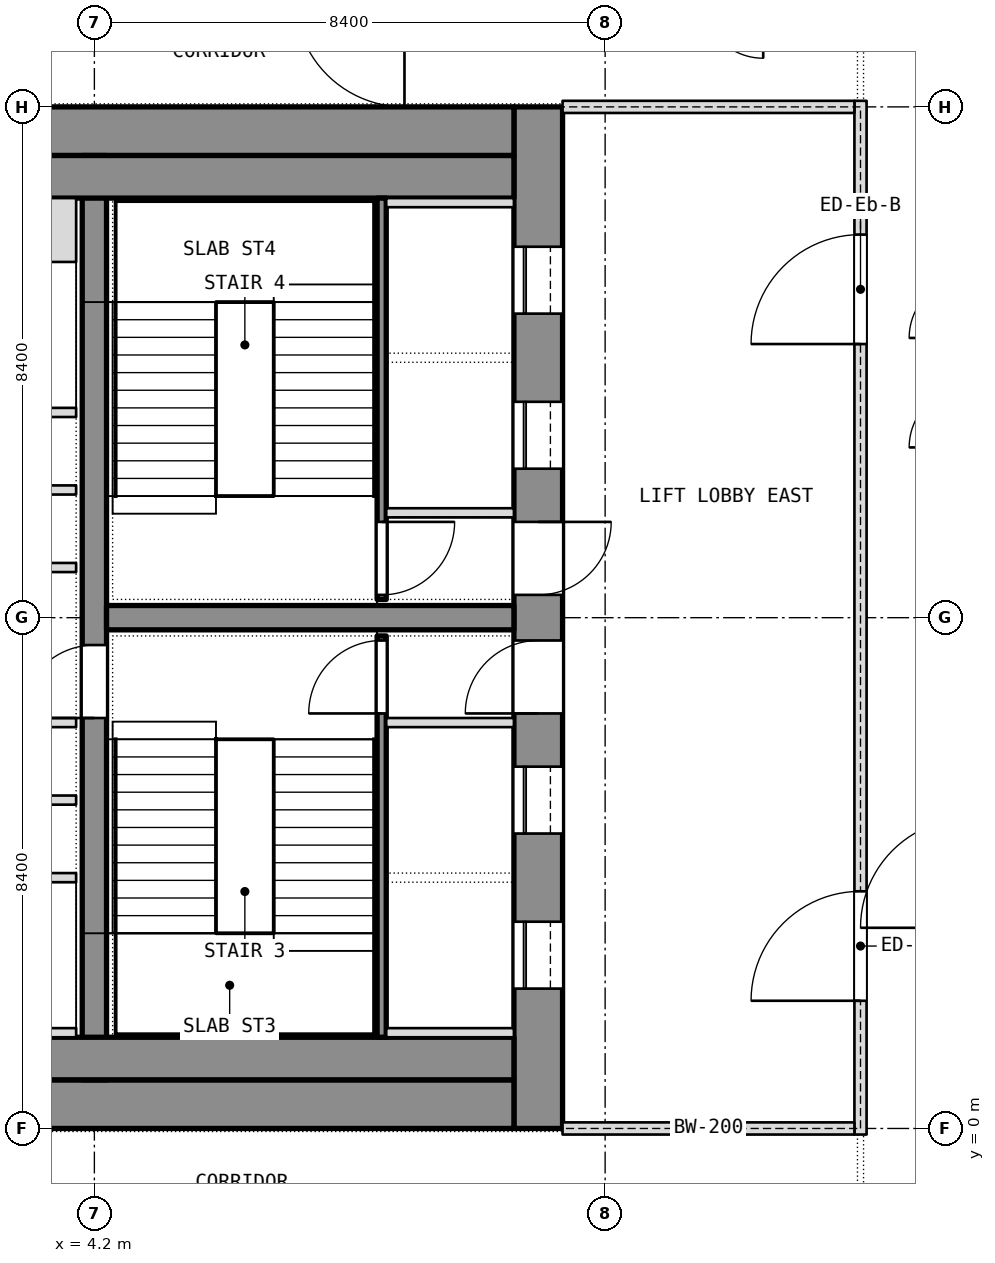
"""IFC4 building model, lengths in metres.
Left out: names, types, materials, properties, quantities, classifications, styles, units other than length and angle.
Written with IfcOpenShell. Run it as: python <this file> out.ifc"""

import sys

from ifc_helpers import new_model, si_unit, direction, frame, frame_2d, origin, place, context, subcontext, project, spatial, rectangle, extrude, element, fill, save


model = new_model("IFC4")
c1 = context("Model", 3, precision=1e-05, world=origin(), true_north=direction((0.0, 1.0)))
c2 = subcontext(c1, "Body", "Model", "MODEL_VIEW")
j1 = project(units=[si_unit("LENGTHUNIT", "METRE"), si_unit("PLANEANGLEUNIT", "RADIAN")], contexts=[c1])
p1 = place(None, origin())
s1 = spatial("IfcSite", under=j1, at=p1, CompositionType="ELEMENT")
p2 = place(p1, origin())
s2 = spatial("IfcBuilding", under=s1, at=p2, CompositionType="ELEMENT")
p3 = place(p2, frame((0.0, 0.0, 202.1)))
s3 = spatial("IfcBuildingStorey", under=s2, at=p3, CompositionType="ELEMENT", Elevation=202.1)
p4 = place(p3, frame((11.5, 0.0, 0.0), z_axis=(0.0, 0.0, 1.0), x_axis=(0.0, 1.0, 0.0)))
e1 = element("IfcWall", 1, at=p4, inside=s3, PredefinedType="SHEAR", context=c2, shape_type="SweptSolid", body=[
    extrude(rectangle(XDim=16.8, YDim=0.8, at=frame_2d((8.4, 0.0))), origin(), (0.0, 0.0, 1.0), 3.6),
])
p5 = place(p4, frame((2.3, 0.0, 0.0)))
e2 = element("IfcOpeningElement", 2, at=p5, cuts=e1, PredefinedType="OPENING", context=c2, shape_type="SweptSolid", body=[
    extrude(rectangle(XDim=1.1, YDim=2.1, at=frame_2d((0.55, 1.05))), frame((0.0, 0.4, 0.0), z_axis=(0.0, -1.0, 0.0), x_axis=(1.0, 0.0, 0.0)), (0.0, 0.0, 1.0), 0.8),
])
p6 = place(p4, frame((4.85, 0.0, 0.0)))
e3 = element("IfcOpeningElement", 3, at=p6, cuts=e1, PredefinedType="OPENING", context=c2, shape_type="SweptSolid", body=[
    extrude(rectangle(XDim=1.1, YDim=2.1, at=frame_2d((0.55, 1.05))), frame((0.0, 0.4, 0.0), z_axis=(0.0, -1.0, 0.0), x_axis=(1.0, 0.0, 0.0)), (0.0, 0.0, 1.0), 0.8),
])
p7 = place(p4, frame((6.825, 0.0, 0.0)))
e4 = element("IfcOpeningElement", 4, at=p7, cuts=e1, PredefinedType="OPENING", context=c2, shape_type="SweptSolid", body=[
    extrude(rectangle(XDim=1.2, YDim=2.1, at=frame_2d((0.6, 1.05))), frame((0.0, 0.4, 0.0), z_axis=(0.0, -1.0, 0.0), x_axis=(1.0, 0.0, 0.0)), (0.0, 0.0, 1.0), 0.8),
])
p8 = place(p4, frame((13.4, 0.0, 0.0)))
e5 = element("IfcOpeningElement", 5, at=p8, cuts=e1, PredefinedType="OPENING", context=c2, shape_type="SweptSolid", body=[
    extrude(rectangle(XDim=1.1, YDim=2.1, at=frame_2d((0.55, 1.05))), frame((0.0, 0.4, 0.0), z_axis=(0.0, -1.0, 0.0), x_axis=(1.0, 0.0, 0.0)), (0.0, 0.0, 1.0), 0.8),
])
p9 = place(p4, frame((10.85, 0.0, 0.0)))
e6 = element("IfcOpeningElement", 6, at=p9, cuts=e1, PredefinedType="OPENING", context=c2, shape_type="SweptSolid", body=[
    extrude(rectangle(XDim=1.1, YDim=2.1, at=frame_2d((0.55, 1.05))), frame((0.0, 0.4, 0.0), z_axis=(0.0, -1.0, 0.0), x_axis=(1.0, 0.0, 0.0)), (0.0, 0.0, 1.0), 0.8),
])
p10 = place(p4, frame((8.775, 0.0, 0.0)))
e7 = element("IfcOpeningElement", 7, at=p10, cuts=e1, PredefinedType="OPENING", context=c2, shape_type="SweptSolid", body=[
    extrude(rectangle(XDim=1.2, YDim=2.1, at=frame_2d((0.6, 1.05))), frame((0.0, 0.4, 0.0), z_axis=(0.0, -1.0, 0.0), x_axis=(1.0, 0.0, 0.0)), (0.0, 0.0, 1.0), 0.8),
])
for number, where, z_axis, x_axis in (
    (8, (-11.1, 0.4, 0.0), (0.0, 0.0, 1.0), (1.0, 0.0, 0.0)),
    (9, (-11.1, 16.4, 0.0), (0.0, 0.0, 1.0), (1.0, 0.0, 0.0)),
):
    element("IfcWall", number, at=place(p3, frame(where, z_axis=z_axis, x_axis=x_axis)), inside=s3, PredefinedType="SHEAR", context=c2, shape_type="SweptSolid", body=[
        extrude(rectangle(XDim=22.2, YDim=0.8, at=frame_2d((11.1, 0.0))), origin(), (0.0, 0.0, 1.0), 3.6),
    ])
p11 = place(p3, frame((4.2, 0.8, 0.0), z_axis=(0.0, 0.0, 1.0), x_axis=(0.0, 1.0, 0.0)))
e10 = element("IfcWall", 10, at=p11, inside=s3, PredefinedType="SHEAR", context=c2, shape_type="SweptSolid", body=[
    extrude(rectangle(XDim=15.2, YDim=0.4, at=frame_2d((7.6, 0.0))), origin(), (0.0, 0.0, 1.0), 3.6),
])
p12 = place(p11, frame((5.95, 0.0, 0.0)))
e11 = element("IfcOpeningElement", 11, at=p12, cuts=e10, PredefinedType="OPENING", context=c2, shape_type="SweptSolid", body=[
    extrude(rectangle(XDim=1.2, YDim=2.1, at=frame_2d((0.6, 1.05))), frame((0.0, 0.2, 0.0), z_axis=(0.0, -1.0, 0.0), x_axis=(1.0, 0.0, 0.0)), (0.0, 0.0, 1.0), 0.4),
])
p13 = place(p3, frame((4.4, 8.4, 0.0), z_axis=(0.0, 0.0, 1.0), x_axis=(1.0, 0.0, 0.0)))
e12 = element("IfcWall", 12, at=p13, inside=s3, PredefinedType="SHEAR", context=c2, shape_type="SweptSolid", body=[
    extrude(rectangle(XDim=6.7, YDim=0.4, at=frame_2d((3.35, 0.0))), origin(), (0.0, 0.0, 1.0), 3.6),
])
for number, where, z_axis, x_axis in (
    (13, (-11.1, 1.15, 0.0), (0.0, 0.0, 1.0), (1.0, 0.0, 0.0)),
    (14, (-11.1, 15.65, 0.0), (0.0, 0.0, 1.0), (1.0, 0.0, 0.0)),
):
    element("IfcWall", number, at=place(p3, frame(where, z_axis=z_axis, x_axis=x_axis)), inside=s3, PredefinedType="PARTITIONING", context=c2, shape_type="SweptSolid", body=[
        extrude(rectangle(XDim=22.2, YDim=0.7, at=frame_2d((11.1, 0.0))), origin(), (0.0, 0.0, 1.0), 3.34),
    ])
p14 = place(p3, frame((8.925, 1.5, 0.0), z_axis=(0.0, 0.0, 1.0), x_axis=(0.0, 1.0, 0.0)))
e15 = element("IfcWall", 15, at=p14, inside=s3, PredefinedType="SHEAR", context=c2, shape_type="SweptSolid", body=[
    extrude(rectangle(XDim=6.6, YDim=0.15, at=frame_2d((3.3, 0.0))), origin(), (0.0, 0.0, 1.0), 3.34),
])
p15 = place(p14, frame((5.325, 0.0, 0.0)))
e16 = element("IfcOpeningElement", 16, at=p15, cuts=e15, PredefinedType="OPENING", context=c2, shape_type="SweptSolid", body=[
    extrude(rectangle(XDim=1.2, YDim=2.1, at=frame_2d((0.6, 1.05))), frame((0.0, 0.075, 0.0), z_axis=(0.0, -1.0, 0.0), x_axis=(1.0, 0.0, 0.0)), (0.0, 0.0, 1.0), 0.15),
])
for number, where, z_axis, x_axis in (
    (17, (9.0, 6.675, 0.0), (0.0, 0.0, 1.0), (1.0, 0.0, 0.0)),
    (18, (9.0, 1.575, 0.0), (0.0, 0.0, 1.0), (1.0, 0.0, 0.0)),
):
    element("IfcWall", number, at=place(p3, frame(where, z_axis=z_axis, x_axis=x_axis)), inside=s3, PredefinedType="SHEAR", context=c2, shape_type="SweptSolid", body=[
        extrude(rectangle(XDim=2.1, YDim=0.15, at=frame_2d((1.05, 0.0))), origin(), (0.0, 0.0, 1.0), 3.6),
    ])
p16 = place(p3, frame((8.925, 8.7, 0.0), z_axis=(0.0, 0.0, 1.0), x_axis=(0.0, 1.0, 0.0)))
e19 = element("IfcWall", 19, at=p16, inside=s3, PredefinedType="SHEAR", context=c2, shape_type="SweptSolid", body=[
    extrude(rectangle(XDim=6.6, YDim=0.15, at=frame_2d((3.3, 0.0))), origin(), (0.0, 0.0, 1.0), 3.34),
])
p17 = place(p16, frame((0.075, 0.0, 0.0)))
e20 = element("IfcOpeningElement", 20, at=p17, cuts=e19, PredefinedType="OPENING", context=c2, shape_type="SweptSolid", body=[
    extrude(rectangle(XDim=1.2, YDim=2.1, at=frame_2d((0.6, 1.05))), frame((0.0, 0.075, 0.0), z_axis=(0.0, -1.0, 0.0), x_axis=(1.0, 0.0, 0.0)), (0.0, 0.0, 1.0), 0.15),
])
for number, where, z_axis, x_axis in (
    (21, (9.0, 10.125, 0.0), (0.0, 0.0, 1.0), (1.0, 0.0, 0.0)),
    (22, (9.0, 15.225, 0.0), (0.0, 0.0, 1.0), (1.0, 0.0, 0.0)),
):
    element("IfcWall", number, at=place(p3, frame(where, z_axis=z_axis, x_axis=x_axis)), inside=s3, PredefinedType="SHEAR", context=c2, shape_type="SweptSolid", body=[
        extrude(rectangle(XDim=2.1, YDim=0.15, at=frame_2d((1.05, 0.0))), origin(), (0.0, 0.0, 1.0), 3.6),
    ])
p18 = place(p3, frame((-3.9, 4.125, 0.0), z_axis=(0.0, 0.0, 1.0), x_axis=(1.0, 0.0, 0.0)))
e23 = element("IfcWall", 23, at=p18, inside=s3, PredefinedType="PARTITIONING", context=c2, shape_type="SweptSolid", body=[
    extrude(rectangle(XDim=7.8, YDim=0.15, at=frame_2d((3.9, 0.0))), origin(), (0.0, 0.0, 1.0), 3.34),
])
p19 = place(p18, frame((3.75, 0.0, 0.0)))
e24 = element("IfcOpeningElement", 24, at=p19, cuts=e23, PredefinedType="OPENING", context=c2, shape_type="SweptSolid", body=[
    extrude(rectangle(XDim=1.2, YDim=2.1, at=frame_2d((0.6, 1.05))), frame((0.0, 0.075, 0.0), z_axis=(0.0, -1.0, 0.0), x_axis=(1.0, 0.0, 0.0)), (0.0, 0.0, 1.0), 0.15),
])
p20 = place(p3, frame((-3.9, 11.775, 0.0), z_axis=(0.0, 0.0, 1.0), x_axis=(1.0, 0.0, 0.0)))
e25 = element("IfcWall", 25, at=p20, inside=s3, PredefinedType="PARTITIONING", context=c2, shape_type="SweptSolid", body=[
    extrude(rectangle(XDim=7.8, YDim=0.15, at=frame_2d((3.9, 0.0))), origin(), (0.0, 0.0, 1.0), 3.34),
])
p21 = place(p20, frame((3.3, 0.0, 0.0)))
e26 = element("IfcOpeningElement", 26, at=p21, cuts=e25, PredefinedType="OPENING", context=c2, shape_type="SweptSolid", body=[
    extrude(rectangle(XDim=1.2, YDim=2.1, at=frame_2d((0.6, 1.05))), frame((0.0, 0.075, 0.0), z_axis=(0.0, -1.0, 0.0), x_axis=(1.0, 0.0, 0.0)), (0.0, 0.0, 1.0), 0.15),
])
p22 = place(p3, frame((1.65, 1.575, 0.0), z_axis=(0.0, 0.0, 1.0), x_axis=(1.0, 0.0, 0.0)))
e27 = element("IfcWall", 27, at=p22, inside=s3, PredefinedType="SHEAR", context=c2, shape_type="SweptSolid", body=[
    extrude(rectangle(XDim=2.25, YDim=0.15, at=frame_2d((1.125, 0.0))), origin(), (0.0, 0.0, 1.0), 3.6),
])
p23 = place(p3, frame((1.65, 14.775, 0.0), z_axis=(0.0, 0.0, 1.0), x_axis=(1.0, 0.0, 0.0)))
e28 = element("IfcWall", 28, at=p23, inside=s3, PredefinedType="SHEAR", context=c2, shape_type="SweptSolid", body=[
    extrude(rectangle(XDim=2.25, YDim=1.05, at=frame_2d((1.125, 0.0))), origin(), (0.0, 0.0, 1.0), 3.6),
])
for number, where, z_axis, x_axis in (
    (29, (1.65, 6.675, 0.0), (0.0, 0.0, 1.0), (1.0, 0.0, 0.0)),
    (30, (1.65, 9.225, 0.0), (0.0, 0.0, 1.0), (1.0, 0.0, 0.0)),
):
    element("IfcWall", number, at=place(p3, frame(where, z_axis=z_axis, x_axis=x_axis)), inside=s3, PredefinedType="PARTITIONING", context=c2, shape_type="SweptSolid", body=[
        extrude(rectangle(XDim=2.25, YDim=0.15, at=frame_2d((1.125, 0.0))), origin(), (0.0, 0.0, 1.0), 3.34),
    ])
for number, where, z_axis, x_axis in (
    (31, (1.8, 5.4, 0.0), (0.0, 0.0, 1.0), (1.0, 0.0, 0.0)),
    (32, (1.8, 10.5, 0.0), (0.0, 0.0, 1.0), (1.0, 0.0, 0.0)),
):
    element("IfcWall", number, at=place(p3, frame(where, z_axis=z_axis, x_axis=x_axis)), inside=s3, PredefinedType="PARTITIONING", context=c2, shape_type="SweptSolid", body=[
        extrude(rectangle(XDim=2.1, YDim=0.15, at=frame_2d((1.05, 0.0))), origin(), (0.0, 0.0, 1.0), 3.34),
    ])
p24 = place(p3, frame((16.8, -0.1, 0.0), z_axis=(0.0, 0.0, 1.0), x_axis=(0.0, 1.0, 0.0)))
e33 = element("IfcWall", 33, at=p24, inside=s3, PredefinedType="PARTITIONING", context=c2, shape_type="SweptSolid", body=[
    extrude(rectangle(XDim=17.0, YDim=0.2, at=frame_2d((8.5, 0.0))), origin(), (0.0, 0.0, 1.0), 3.34),
])
p25 = place(p24, frame((2.2, 0.0, 0.0)))
e34 = element("IfcOpeningElement", 34, at=p25, cuts=e33, PredefinedType="OPENING", context=c2, shape_type="SweptSolid", body=[
    extrude(rectangle(XDim=1.8, YDim=2.1, at=frame_2d((0.9, 1.05))), frame((0.0, 0.1, 0.0), z_axis=(0.0, -1.0, 0.0), x_axis=(1.0, 0.0, 0.0)), (0.0, 0.0, 1.0), 0.2),
])
p26 = place(p24, frame((13.0, 0.0, 0.0)))
e35 = element("IfcOpeningElement", 35, at=p26, cuts=e33, PredefinedType="OPENING", context=c2, shape_type="SweptSolid", body=[
    extrude(rectangle(XDim=1.8, YDim=2.1, at=frame_2d((0.9, 1.05))), frame((0.0, 0.1, 0.0), z_axis=(0.0, -1.0, 0.0), x_axis=(1.0, 0.0, 0.0)), (0.0, 0.0, 1.0), 0.2),
])
for number, where, z_axis, x_axis in (
    (36, (11.9, 0.0, 0.0), (0.0, 0.0, 1.0), (1.0, 0.0, 0.0)),
    (37, (11.9, 16.8, 0.0), (0.0, 0.0, 1.0), (1.0, 0.0, 0.0)),
):
    element("IfcWall", number, at=place(p3, frame(where, z_axis=z_axis, x_axis=x_axis)), inside=s3, PredefinedType="PARTITIONING", context=c2, shape_type="SweptSolid", body=[
        extrude(rectangle(XDim=4.8, YDim=0.2, at=frame_2d((2.4, 0.0))), origin(), (0.0, 0.0, 1.0), 2.94),
    ])
p27 = place(p5, origin())
e38 = element("IfcDoor", 38, at=p27, inside=s3, OperationType="SLIDING_TO_LEFT", PredefinedType="DOOR", context=c2, shape_type="SweptSolid", body=[
    extrude(rectangle(XDim=1.1, YDim=2.1, at=frame_2d((0.55, 1.05))), frame((0.0, 0.025, 0.0), z_axis=(0.0, -1.0, 0.0), x_axis=(1.0, 0.0, 0.0)), (0.0, 0.0, 1.0), 0.05),
])
fill(e2, e38)
p28 = place(p6, origin())
e39 = element("IfcDoor", 39, at=p28, inside=s3, OperationType="SLIDING_TO_LEFT", PredefinedType="DOOR", context=c2, shape_type="SweptSolid", body=[
    extrude(rectangle(XDim=1.1, YDim=2.1, at=frame_2d((0.55, 1.05))), frame((0.0, 0.025, 0.0), z_axis=(0.0, -1.0, 0.0), x_axis=(1.0, 0.0, 0.0)), (0.0, 0.0, 1.0), 0.05),
])
fill(e3, e39)
p29 = place(p7, origin())
e40 = element("IfcDoor", 40, at=p29, inside=s3, OperationType="SINGLE_SWING_LEFT", PredefinedType="DOOR", context=c2, shape_type="SweptSolid", body=[
    extrude(rectangle(XDim=1.2, YDim=2.1, at=frame_2d((0.6, 1.05))), frame((0.0, 0.025, 0.0), z_axis=(0.0, -1.0, 0.0), x_axis=(1.0, 0.0, 0.0)), (0.0, 0.0, 1.0), 0.05),
])
fill(e4, e40)
p30 = place(p15, origin())
e41 = element("IfcDoor", 41, at=p30, inside=s3, OperationType="SINGLE_SWING_LEFT", PredefinedType="DOOR", context=c2, shape_type="SweptSolid", body=[
    extrude(rectangle(XDim=1.2, YDim=2.1, at=frame_2d((0.6, 1.05))), frame((0.0, 0.025, 0.0), z_axis=(0.0, -1.0, 0.0), x_axis=(1.0, 0.0, 0.0)), (0.0, 0.0, 1.0), 0.05),
])
fill(e16, e41)
p31 = place(p8, origin())
e42 = element("IfcDoor", 42, at=p31, inside=s3, OperationType="SLIDING_TO_LEFT", PredefinedType="DOOR", context=c2, shape_type="SweptSolid", body=[
    extrude(rectangle(XDim=1.1, YDim=2.1, at=frame_2d((0.55, 1.05))), frame((0.0, 0.025, 0.0), z_axis=(0.0, -1.0, 0.0), x_axis=(1.0, 0.0, 0.0)), (0.0, 0.0, 1.0), 0.05),
])
fill(e5, e42)
p32 = place(p9, origin())
e43 = element("IfcDoor", 43, at=p32, inside=s3, OperationType="SLIDING_TO_LEFT", PredefinedType="DOOR", context=c2, shape_type="SweptSolid", body=[
    extrude(rectangle(XDim=1.1, YDim=2.1, at=frame_2d((0.55, 1.05))), frame((0.0, 0.025, 0.0), z_axis=(0.0, -1.0, 0.0), x_axis=(1.0, 0.0, 0.0)), (0.0, 0.0, 1.0), 0.05),
])
fill(e6, e43)
p33 = place(p10, origin())
e44 = element("IfcDoor", 44, at=p33, inside=s3, OperationType="SINGLE_SWING_LEFT", PredefinedType="DOOR", context=c2, shape_type="SweptSolid", body=[
    extrude(rectangle(XDim=1.2, YDim=2.1, at=frame_2d((0.6, 1.05))), frame((0.0, 0.025, 0.0), z_axis=(0.0, -1.0, 0.0), x_axis=(1.0, 0.0, 0.0)), (0.0, 0.0, 1.0), 0.05),
])
fill(e7, e44)
p34 = place(p17, origin())
e45 = element("IfcDoor", 45, at=p34, inside=s3, OperationType="SINGLE_SWING_LEFT", PredefinedType="DOOR", context=c2, shape_type="SweptSolid", body=[
    extrude(rectangle(XDim=1.2, YDim=2.1, at=frame_2d((0.6, 1.05))), frame((0.0, 0.025, 0.0), z_axis=(0.0, -1.0, 0.0), x_axis=(1.0, 0.0, 0.0)), (0.0, 0.0, 1.0), 0.05),
])
fill(e20, e45)
p35 = place(p12, origin())
e46 = element("IfcDoor", 46, at=p35, inside=s3, OperationType="SINGLE_SWING_LEFT", PredefinedType="DOOR", context=c2, shape_type="SweptSolid", body=[
    extrude(rectangle(XDim=1.2, YDim=2.1, at=frame_2d((0.6, 1.05))), frame((0.0, 0.025, 0.0), z_axis=(0.0, -1.0, 0.0), x_axis=(1.0, 0.0, 0.0)), (0.0, 0.0, 1.0), 0.05),
])
fill(e11, e46)
p36 = place(p25, origin())
e47 = element("IfcDoor", 47, at=p36, inside=s3, OperationType="DOUBLE_DOOR_SINGLE_SWING", PredefinedType="DOOR", context=c2, shape_type="SweptSolid", body=[
    extrude(rectangle(XDim=1.8, YDim=2.1, at=frame_2d((0.9, 1.05))), frame((0.0, 0.025, 0.0), z_axis=(0.0, -1.0, 0.0), x_axis=(1.0, 0.0, 0.0)), (0.0, 0.0, 1.0), 0.05),
])
fill(e34, e47)
p37 = place(p26, origin())
e48 = element("IfcDoor", 48, at=p37, inside=s3, OperationType="DOUBLE_DOOR_SINGLE_SWING", PredefinedType="DOOR", context=c2, shape_type="SweptSolid", body=[
    extrude(rectangle(XDim=1.8, YDim=2.1, at=frame_2d((0.9, 1.05))), frame((0.0, 0.025, 0.0), z_axis=(0.0, -1.0, 0.0), x_axis=(1.0, 0.0, 0.0)), (0.0, 0.0, 1.0), 0.05),
])
fill(e35, e48)
save(model, sys.argv[1])
